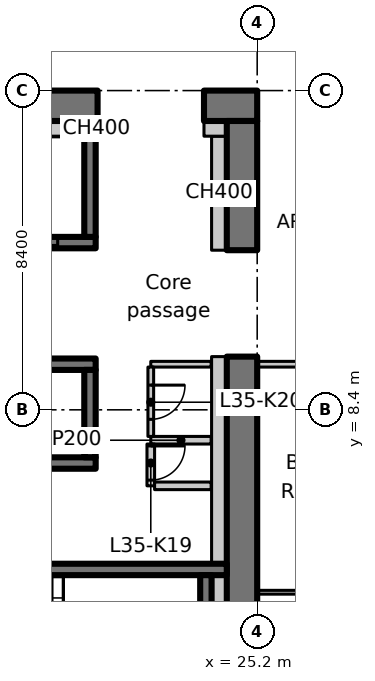
"""IFC4 building model, lengths in metres.
Left out: names, types, materials, properties, quantities, classifications, styles, units other than length and angle.
Written with IfcOpenShell. Run it as: python <this file> out.ifc"""

import sys

from ifc_helpers import new_model, si_unit, direction, frame, frame_2d, origin, place, context, subcontext, project, spatial, rectangle, extrude, element, fill, save


model = new_model("IFC4")
c1 = context("Model", 3, precision=1e-05, world=origin(), true_north=direction((0.0, 1.0)))
c2 = subcontext(c1, "Body", "Model", "MODEL_VIEW")
j1 = project(units=[si_unit("LENGTHUNIT", "METRE"), si_unit("PLANEANGLEUNIT", "RADIAN")], contexts=[c1])
p1 = place(None, origin())
s1 = spatial("IfcSite", under=j1, at=p1, CompositionType="ELEMENT")
p2 = place(p1, origin())
s2 = spatial("IfcBuilding", under=s1, at=p2, CompositionType="ELEMENT")
p3 = place(p2, frame((0.0, 0.0, 142.1)))
s3 = spatial("IfcBuildingStorey", under=s2, at=p3, CompositionType="ELEMENT", Elevation=142.1)
p4 = place(p3, frame((-1.1, 16.4, 0.0), z_axis=(0.0, 0.0, 1.0), x_axis=(1.0, 0.0, 0.0)))
e1 = element("IfcWall", 1, at=p4, inside=s3, PredefinedType="SHEAR", context=c2, shape_type="SweptSolid", body=[
    extrude(rectangle(XDim=22.1, YDim=0.8, at=frame_2d((11.05, 0.0))), origin(), (0.0, 0.0, 1.0), 3.35),
])
p5 = place(p4, frame((3.15, 0.0, 0.0)))
e2 = element("IfcOpeningElement", 2, at=p5, cuts=e1, PredefinedType="OPENING", context=c2, shape_type="SweptSolid", body=[
    extrude(rectangle(XDim=1.1, YDim=2.3, at=frame_2d((0.55, 1.15))), frame((0.0, 0.41, 0.0), z_axis=(0.0, -1.0, 0.0), x_axis=(1.0, 0.0, 0.0)), (0.0, 0.0, 1.0), 0.82),
])
p6 = place(p3, frame((23.8, 16.4, 0.0), z_axis=(0.0, 0.0, 1.0), x_axis=(1.0, 0.0, 0.0)))
e3 = element("IfcWall", 3, at=p6, inside=s3, PredefinedType="SHEAR", context=c2, shape_type="SweptSolid", body=[
    extrude(rectangle(XDim=1.4, YDim=0.8, at=frame_2d((0.7, 0.0))), origin(), (0.0, 0.0, 1.0), 3.35),
])
p7 = place(p3, frame((24.8, 0.8, 0.0), z_axis=(0.0, 0.0, 1.0), x_axis=(0.0, 1.0, 0.0)))
e4 = element("IfcWall", 4, at=p7, inside=s3, PredefinedType="SHEAR", context=c2, shape_type="SweptSolid", body=[
    extrude(rectangle(XDim=9.0, YDim=0.8, at=frame_2d((4.5, 0.0))), origin(), (0.0, 0.0, 1.0), 3.35),
])
p8 = place(p3, frame((24.8, 12.6, 0.0), z_axis=(0.0, 0.0, 1.0), x_axis=(0.0, 1.0, 0.0)))
e5 = element("IfcWall", 5, at=p8, inside=s3, PredefinedType="SHEAR", context=c2, shape_type="SweptSolid", body=[
    extrude(rectangle(XDim=3.4, YDim=0.8, at=frame_2d((1.7, 0.0))), origin(), (0.0, 0.0, 1.0), 3.35),
])
p9 = place(p3, frame((24.2, 12.6, 0.0), z_axis=(0.0, 0.0, 1.0), x_axis=(0.0, 1.0, 0.0)))
e6 = element("IfcWall", 6, at=p9, inside=s3, PredefinedType="PARTITIONING", context=c2, shape_type="SweptSolid", body=[
    extrude(rectangle(XDim=3.0, YDim=0.4, at=frame_2d((1.5, 0.0))), origin(), (0.0, 0.0, 1.0), 3.35),
])
p10 = place(p3, frame((23.8, 15.8, 0.0), z_axis=(0.0, 0.0, 1.0), x_axis=(1.0, 0.0, 0.0)))
e7 = element("IfcWall", 7, at=p10, inside=s3, PredefinedType="PARTITIONING", context=c2, shape_type="SweptSolid", body=[
    extrude(rectangle(XDim=0.6, YDim=0.4, at=frame_2d((0.3, 0.0))), origin(), (0.0, 0.0, 1.0), 3.35),
])
p11 = place(p3, frame((0.8, 7.0, 0.0), z_axis=(0.0, 0.0, 1.0), x_axis=(1.0, 0.0, 0.0)))
e8 = element("IfcWall", 8, at=p11, inside=s3, PredefinedType="SHEAR", context=c2, shape_type="SweptSolid", body=[
    extrude(rectangle(XDim=20.15, YDim=0.3, at=frame_2d((10.075, 0.0))), origin(), (0.0, 0.0, 1.0), 3.35),
])
p12 = place(p3, frame((0.8, 9.6, 0.0), z_axis=(0.0, 0.0, 1.0), x_axis=(1.0, 0.0, 0.0)))
e9 = element("IfcWall", 9, at=p12, inside=s3, PredefinedType="SHEAR", context=c2, shape_type="SweptSolid", body=[
    extrude(rectangle(XDim=20.15, YDim=0.3, at=frame_2d((10.075, 0.0))), origin(), (0.0, 0.0, 1.0), 3.35),
])
p13 = place(p12, frame((1.25, 0.0, 0.0)))
e10 = element("IfcOpeningElement", 10, at=p13, cuts=e9, PredefinedType="OPENING", context=c2, shape_type="SweptSolid", body=[
    extrude(rectangle(XDim=1.1, YDim=2.3, at=frame_2d((0.55, 1.15))), frame((0.0, 0.16, 0.0), z_axis=(0.0, -1.0, 0.0), x_axis=(1.0, 0.0, 0.0)), (0.0, 0.0, 1.0), 0.32),
])
p14 = place(p12, frame((4.05, 0.0, 0.0)))
e11 = element("IfcOpeningElement", 11, at=p14, cuts=e9, PredefinedType="OPENING", context=c2, shape_type="SweptSolid", body=[
    extrude(rectangle(XDim=1.1, YDim=2.3, at=frame_2d((0.55, 1.15))), frame((0.0, 0.16, 0.0), z_axis=(0.0, -1.0, 0.0), x_axis=(1.0, 0.0, 0.0)), (0.0, 0.0, 1.0), 0.32),
])
p15 = place(p12, frame((6.85, 0.0, 0.0)))
e12 = element("IfcOpeningElement", 12, at=p15, cuts=e9, PredefinedType="OPENING", context=c2, shape_type="SweptSolid", body=[
    extrude(rectangle(XDim=1.1, YDim=2.3, at=frame_2d((0.55, 1.15))), frame((0.0, 0.16, 0.0), z_axis=(0.0, -1.0, 0.0), x_axis=(1.0, 0.0, 0.0)), (0.0, 0.0, 1.0), 0.32),
])
p16 = place(p12, frame((9.65, 0.0, 0.0)))
e13 = element("IfcOpeningElement", 13, at=p16, cuts=e9, PredefinedType="OPENING", context=c2, shape_type="SweptSolid", body=[
    extrude(rectangle(XDim=1.1, YDim=2.3, at=frame_2d((0.55, 1.15))), frame((0.0, 0.16, 0.0), z_axis=(0.0, -1.0, 0.0), x_axis=(1.0, 0.0, 0.0)), (0.0, 0.0, 1.0), 0.32),
])
p17 = place(p12, frame((12.45, 0.0, 0.0)))
e14 = element("IfcOpeningElement", 14, at=p17, cuts=e9, PredefinedType="OPENING", context=c2, shape_type="SweptSolid", body=[
    extrude(rectangle(XDim=1.1, YDim=2.3, at=frame_2d((0.55, 1.15))), frame((0.0, 0.16, 0.0), z_axis=(0.0, -1.0, 0.0), x_axis=(1.0, 0.0, 0.0)), (0.0, 0.0, 1.0), 0.32),
])
p18 = place(p12, frame((15.25, 0.0, 0.0)))
e15 = element("IfcOpeningElement", 15, at=p18, cuts=e9, PredefinedType="OPENING", context=c2, shape_type="SweptSolid", body=[
    extrude(rectangle(XDim=1.1, YDim=2.3, at=frame_2d((0.55, 1.15))), frame((0.0, 0.16, 0.0), z_axis=(0.0, -1.0, 0.0), x_axis=(1.0, 0.0, 0.0)), (0.0, 0.0, 1.0), 0.32),
])
p19 = place(p3, frame((20.8, 7.15, 0.0), z_axis=(0.0, 0.0, 1.0), x_axis=(0.0, 1.0, 0.0)))
e16 = element("IfcWall", 16, at=p19, inside=s3, PredefinedType="SHEAR", context=c2, shape_type="SweptSolid", body=[
    extrude(rectangle(XDim=2.3, YDim=0.3, at=frame_2d((1.15, 0.0))), origin(), (0.0, 0.0, 1.0), 3.35),
])
p20 = place(p3, frame((15.05, 12.8, 0.0), z_axis=(0.0, 0.0, 1.0), x_axis=(1.0, 0.0, 0.0)))
e17 = element("IfcWall", 17, at=p20, inside=s3, PredefinedType="SHEAR", context=c2, shape_type="SweptSolid", body=[
    extrude(rectangle(XDim=5.9, YDim=0.3, at=frame_2d((2.95, 0.0))), origin(), (0.0, 0.0, 1.0), 3.35),
])
p21 = place(p20, frame((3.8, 0.0, 0.0)))
e18 = element("IfcOpeningElement", 18, at=p21, cuts=e17, PredefinedType="OPENING", context=c2, shape_type="SweptSolid", body=[
    extrude(rectangle(XDim=1.1, YDim=2.3, at=frame_2d((0.55, 1.15))), frame((0.0, 0.16, 0.0), z_axis=(0.0, -1.0, 0.0), x_axis=(1.0, 0.0, 0.0)), (0.0, 0.0, 1.0), 0.32),
])
p22 = place(p3, frame((20.8, 12.95, 0.0), z_axis=(0.0, 0.0, 1.0), x_axis=(0.0, 1.0, 0.0)))
e19 = element("IfcWall", 19, at=p22, inside=s3, PredefinedType="SHEAR", context=c2, shape_type="SweptSolid", body=[
    extrude(rectangle(XDim=3.05, YDim=0.3, at=frame_2d((1.525, 0.0))), origin(), (0.0, 0.0, 1.0), 3.35),
])
p23 = place(p3, frame((15.8, 4.2, 0.0), z_axis=(0.0, 0.0, 1.0), x_axis=(1.0, 0.0, 0.0)))
e20 = element("IfcWall", 20, at=p23, inside=s3, PredefinedType="SHEAR", context=c2, shape_type="SweptSolid", body=[
    extrude(rectangle(XDim=8.6, YDim=0.3, at=frame_2d((4.3, 0.0))), origin(), (0.0, 0.0, 1.0), 3.35),
])
p24 = place(p23, frame((0.4, 0.0, 0.0)))
e21 = element("IfcOpeningElement", 21, at=p24, cuts=e20, PredefinedType="OPENING", context=c2, shape_type="SweptSolid", body=[
    extrude(rectangle(XDim=1.0, YDim=2.1, at=frame_2d((0.5, 1.05))), frame((0.0, 0.16, 0.0), z_axis=(0.0, -1.0, 0.0), x_axis=(1.0, 0.0, 0.0)), (0.0, 0.0, 1.0), 0.32),
])
p25 = place(p3, frame((23.85, 1.5, 0.0), z_axis=(0.0, 0.0, 1.0), x_axis=(0.0, 1.0, 0.0)))
e22 = element("IfcWall", 22, at=p25, inside=s3, PredefinedType="SHEAR", context=c2, shape_type="SweptSolid", body=[
    extrude(rectangle(XDim=2.55, YDim=0.3, at=frame_2d((1.275, 0.0))), origin(), (0.0, 0.0, 1.0), 3.35),
])
p26 = place(p3, frame((23.988, 7.6, 0.0), z_axis=(0.0, 0.0, 1.0), x_axis=(-1.0, 0.0, 0.0)))
e23 = element("IfcWall", 23, at=p26, inside=s3, PredefinedType="PARTITIONING", context=c2, shape_type="SweptSolid", body=[
    extrude(rectangle(XDim=1.588, YDim=0.2, at=frame_2d((0.794, 0.0))), origin(), (0.0, 0.0, 1.0), 3.35),
])
p27 = place(p3, frame((22.4, 7.5, 0.0), z_axis=(0.0, 0.0, 1.0), x_axis=(0.0, -1.0, 0.0)))
e24 = element("IfcWall", 24, at=p27, inside=s3, PredefinedType="PARTITIONING", context=c2, shape_type="SweptSolid", body=[
    extrude(rectangle(XDim=1.1, YDim=0.2, at=frame_2d((0.55, 0.0))), origin(), (0.0, 0.0, 1.0), 3.35),
])
p28 = place(p27, frame((0.05, 0.0, 0.0)))
e25 = element("IfcOpeningElement", 25, at=p28, cuts=e24, PredefinedType="OPENING", context=c2, shape_type="SweptSolid", body=[
    extrude(rectangle(XDim=0.9, YDim=2.1, at=frame_2d((0.45, 1.05))), frame((0.0, 0.11, 0.0), z_axis=(0.0, -1.0, 0.0), x_axis=(1.0, 0.0, 0.0)), (0.0, 0.0, 1.0), 0.22),
])
p29 = place(p3, frame((22.5, 6.4, 0.0), z_axis=(0.0, 0.0, 1.0), x_axis=(1.0, 0.0, 0.0)))
e26 = element("IfcWall", 26, at=p29, inside=s3, PredefinedType="PARTITIONING", context=c2, shape_type="SweptSolid", body=[
    extrude(rectangle(XDim=1.488, YDim=0.2, at=frame_2d((0.744, 0.0))), origin(), (0.0, 0.0, 1.0), 3.35),
])
p30 = place(p3, frame((23.988, 9.6, 0.0), z_axis=(0.0, 0.0, 1.0), x_axis=(-1.0, 0.0, 0.0)))
e27 = element("IfcWall", 27, at=p30, inside=s3, PredefinedType="PARTITIONING", context=c2, shape_type="SweptSolid", body=[
    extrude(rectangle(XDim=1.588, YDim=0.15, at=frame_2d((0.794, 0.0))), origin(), (0.0, 0.0, 1.0), 3.35),
])
p31 = place(p3, frame((22.4, 9.525, 0.0), z_axis=(0.0, 0.0, 1.0), x_axis=(0.0, -1.0, 0.0)))
e28 = element("IfcWall", 28, at=p31, inside=s3, PredefinedType="PARTITIONING", context=c2, shape_type="SweptSolid", body=[
    extrude(rectangle(XDim=1.825, YDim=0.15, at=frame_2d((0.913, 0.0))), origin(), (0.0, 0.0, 1.0), 3.35),
])
p32 = place(p31, frame((0.475, 0.0, 0.0)))
e29 = element("IfcOpeningElement", 29, at=p32, cuts=e28, PredefinedType="OPENING", context=c2, shape_type="SweptSolid", body=[
    extrude(rectangle(XDim=0.9, YDim=2.1, at=frame_2d((0.45, 1.05))), frame((0.0, 0.085, 0.0), z_axis=(0.0, -1.0, 0.0), x_axis=(1.0, 0.0, 0.0)), (0.0, 0.0, 1.0), 0.17),
])
p33 = place(p3, frame((18.15, 15.8, 0.0), z_axis=(0.0, 0.0, 1.0), x_axis=(1.0, 0.0, 0.0)))
e30 = element("IfcWall", 30, at=p33, inside=s3, PredefinedType="PARTITIONING", context=c2, shape_type="SweptSolid", body=[
    extrude(rectangle(XDim=2.5, YDim=0.4, at=frame_2d((1.25, 0.0))), origin(), (0.0, 0.0, 1.0), 3.35),
])
p34 = place(p3, frame((20.95, 15.8, 0.0), z_axis=(0.0, 0.0, 1.0), x_axis=(1.0, 0.0, 0.0)))
e31 = element("IfcWall", 31, at=p34, inside=s3, PredefinedType="PARTITIONING", context=c2, shape_type="SweptSolid", body=[
    extrude(rectangle(XDim=0.05, YDim=0.4, at=frame_2d((0.025, 0.0))), origin(), (0.0, 0.0, 1.0), 3.35),
])
p35 = place(p3, frame((24.2, 1.5, 0.0), z_axis=(0.0, 0.0, 1.0), x_axis=(0.0, 1.0, 0.0)))
e32 = element("IfcWall", 32, at=p35, inside=s3, PredefinedType="PARTITIONING", context=c2, shape_type="SweptSolid", body=[
    extrude(rectangle(XDim=2.55, YDim=0.4, at=frame_2d((1.275, 0.0))), origin(), (0.0, 0.0, 1.0), 3.35),
])
p36 = place(p3, frame((24.2, 4.35, 0.0), z_axis=(0.0, 0.0, 1.0), x_axis=(0.0, 1.0, 0.0)))
e33 = element("IfcWall", 33, at=p36, inside=s3, PredefinedType="PARTITIONING", context=c2, shape_type="SweptSolid", body=[
    extrude(rectangle(XDim=5.45, YDim=0.4, at=frame_2d((2.725, 0.0))), origin(), (0.0, 0.0, 1.0), 3.35),
])
p37 = place(p3, frame((29.4, 9.6, 0.0), z_axis=(0.0, 0.0, 1.0), x_axis=(-1.0, 0.0, 0.0)))
e34 = element("IfcWall", 34, at=p37, inside=s3, PredefinedType="PARTITIONING", context=c2, shape_type="SweptSolid", body=[
    extrude(rectangle(XDim=4.2, YDim=0.15, at=frame_2d((2.1, 0.0))), origin(), (0.0, 0.0, 1.0), 3.33),
])
p38 = place(p3, frame((25.2, 3.6, 0.0), z_axis=(0.0, 0.0, 1.0), x_axis=(1.0, 0.0, 0.0)))
e35 = element("IfcWall", 35, at=p38, inside=s3, PredefinedType="PARTITIONING", context=c2, shape_type="SweptSolid", body=[
    extrude(rectangle(XDim=4.2, YDim=0.1, at=frame_2d((2.1, 0.0))), origin(), (0.0, 0.0, 1.0), 3.33),
])
p39 = place(p21, origin())
e36 = element("IfcDoor", 36, at=p39, inside=s3, OperationType="SLIDING_TO_LEFT", PredefinedType="DOOR", context=c2, shape_type="SweptSolid", body=[
    extrude(rectangle(XDim=1.1, YDim=2.3, at=frame_2d((0.55, 1.15))), frame((0.0, 0.025, 0.0), z_axis=(0.0, -1.0, 0.0), x_axis=(1.0, 0.0, 0.0)), (0.0, 0.0, 1.0), 0.05),
])
fill(e18, e36)
p40 = place(p28, origin())
e37 = element("IfcDoor", 37, at=p40, inside=s3, OperationType="SINGLE_SWING_LEFT", PredefinedType="DOOR", context=c2, shape_type="SweptSolid", body=[
    extrude(rectangle(XDim=0.9, YDim=2.1, at=frame_2d((0.45, 1.05))), frame((0.0, 0.025, 0.0), z_axis=(0.0, -1.0, 0.0), x_axis=(1.0, 0.0, 0.0)), (0.0, 0.0, 1.0), 0.05),
])
fill(e25, e37)
p41 = place(p32, origin())
e38 = element("IfcDoor", 38, at=p41, inside=s3, OperationType="SINGLE_SWING_RIGHT", PredefinedType="DOOR", context=c2, shape_type="SweptSolid", body=[
    extrude(rectangle(XDim=0.9, YDim=2.1, at=frame_2d((0.45, 1.05))), frame((0.0, 0.025, 0.0), z_axis=(0.0, -1.0, 0.0), x_axis=(1.0, 0.0, 0.0)), (0.0, 0.0, 1.0), 0.05),
])
fill(e29, e38)
save(model, sys.argv[1])
